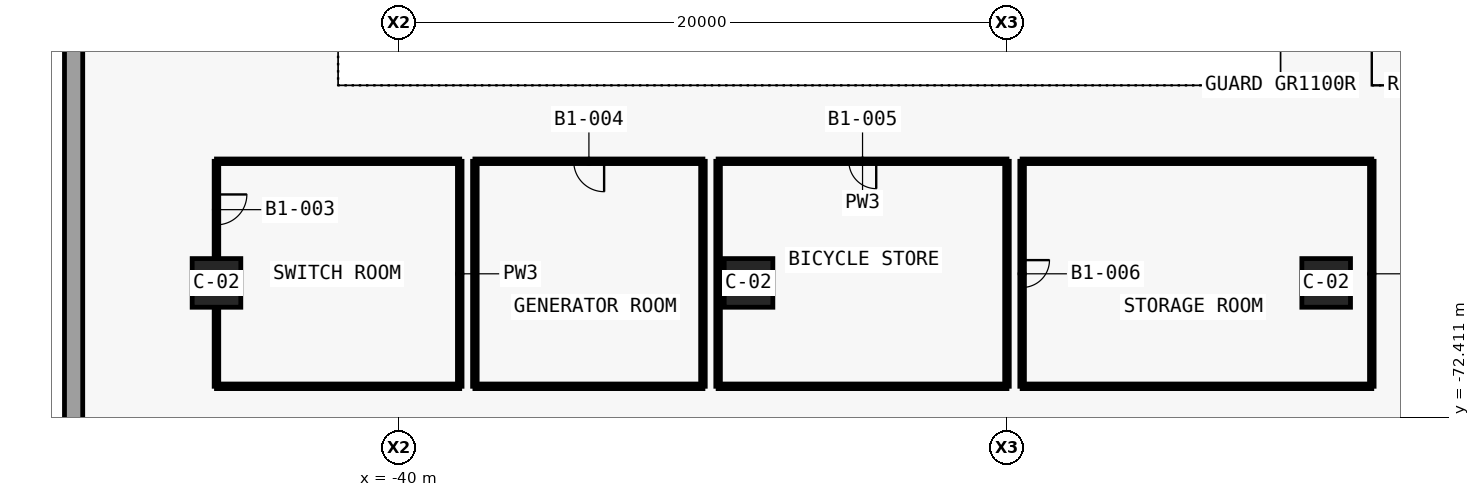
"""IFC4 building model, lengths in metres.
Left out: names, types, materials, properties, quantities, classifications, styles, units other than length and angle.
Written with IfcOpenShell. Run it as: python <this file> out.ifc"""

import sys

from ifc_helpers import new_model, si_unit, direction, frame, frame_2d, origin, origin_2d, place, context, subcontext, project, spatial, polyline, rectangle, outline, extrude, element, fill, save


model = new_model("IFC4")
c1 = context("Model", 3, precision=1e-05, world=origin(), true_north=direction((0.0, 1.0)))
c2 = subcontext(c1, "Body", "Model", "MODEL_VIEW")
j1 = project(units=[si_unit("LENGTHUNIT", "METRE"), si_unit("PLANEANGLEUNIT", "RADIAN")], contexts=[c1])
p1 = place(None, origin())
s1 = spatial("IfcSite", under=j1, at=p1, CompositionType="ELEMENT")
p2 = place(p1, origin())
s2 = spatial("IfcBuilding", under=s1, at=p2, CompositionType="ELEMENT")
p3 = place(p2, frame((0.0, 0.0, -4.5)))
s3 = spatial("IfcBuildingStorey", under=s2, at=p3, CompositionType="ELEMENT", Elevation=-4.5)
p4 = place(p3, frame((-50.7, -1.0, 0.0), z_axis=(0.0, 0.0, 1.0), x_axis=(0.0, -1.0, 0.0)))
e1 = element("IfcWall", 1, at=p4, inside=s3, PredefinedType="SOLIDWALL", context=c2, shape_type="SweptSolid", body=[
    extrude(outline(polyline([(81.4, 0.3), (81.4, -0.3), (0.6, -0.3), (0.6, 0.3), (81.4, 0.3)])), origin(), (0.0, 0.0, 1.0), 4.5),
])
for number, where, z_axis, x_axis in (
    (2, (-46.0, -68.0, 0.0), (0.0, 0.0, 1.0), (1.0, 0.0, 0.0)),
    (3, (-28.5, -68.0, 0.0), (0.0, 0.0, 1.0), (1.0, 0.0, 0.0)),
    (4, (-9.5, -68.0, 0.0), (0.0, 0.0, 1.0), (1.0, 0.0, 0.0)),
):
    element("IfcColumn", number, at=place(p3, frame(where, z_axis=z_axis, x_axis=x_axis)), inside=s3, PredefinedType="COLUMN", context=c2, shape_type="SweptSolid", body=[
        extrude(rectangle(XDim=1.6, YDim=1.6, at=origin_2d()), origin(), (0.0, 0.0, 1.0), 4.5),
    ])
p5 = place(p3, frame((-46.001, -64.0, 0.0), z_axis=(0.0, 0.0, 1.0), x_axis=(0.0, -1.0, 0.0)))
e5 = element("IfcWall", 5, at=p5, inside=s3, PredefinedType="PARTITIONING", context=c2, shape_type="SweptSolid", body=[
    extrude(rectangle(XDim=3.18, YDim=0.15, at=frame_2d((1.59, 0.0))), origin(), (0.0, 0.0, 1.0), 3.03),
])
p6 = place(p5, frame((1.09, 0.0, 0.0)))
e6 = element("IfcOpeningElement", 6, at=p6, cuts=e5, PredefinedType="OPENING", context=c2, shape_type="SweptSolid", body=[
    extrude(rectangle(XDim=1.0, YDim=2.1, at=frame_2d((0.5, 1.05))), frame((0.0, 0.085, 0.0), z_axis=(0.0, -1.0, 0.0), x_axis=(1.0, 0.0, 0.0)), (0.0, 0.0, 1.0), 0.17),
])
p7 = place(p3, frame((-46.001, -68.82, 0.0), z_axis=(0.0, 0.0, 1.0), x_axis=(0.0, -1.0, 0.0)))
e7 = element("IfcWall", 7, at=p7, inside=s3, PredefinedType="PARTITIONING", context=c2, shape_type="SweptSolid", body=[
    extrude(rectangle(XDim=2.58, YDim=0.15, at=frame_2d((1.29, 0.0))), origin(), (0.0, 0.0, 1.0), 4.05),
])
p8 = place(p3, frame((-46.0, -71.401, 0.0), z_axis=(0.0, 0.0, 1.0), x_axis=(1.0, 0.0, 0.0)))
e8 = element("IfcWall", 8, at=p8, inside=s3, PredefinedType="PARTITIONING", context=c2, shape_type="SweptSolid", body=[
    extrude(rectangle(XDim=8.0, YDim=0.15, at=frame_2d((4.0, 0.0))), origin(), (0.0, 0.0, 1.0), 4.05),
])
p9 = place(p3, frame((-37.999, -71.4, 0.0), z_axis=(0.0, 0.0, 1.0), x_axis=(0.0, 1.0, 0.0)))
e9 = element("IfcWall", 9, at=p9, inside=s3, PredefinedType="PARTITIONING", context=c2, shape_type="SweptSolid", body=[
    extrude(rectangle(XDim=7.4, YDim=0.15, at=frame_2d((3.7, 0.0))), origin(), (0.0, 0.0, 1.0), 3.03),
])
p10 = place(p3, frame((-38.0, -63.999, 0.0), z_axis=(0.0, 0.0, 1.0), x_axis=(-1.0, 0.0, 0.0)))
e10 = element("IfcWall", 10, at=p10, inside=s3, PredefinedType="PARTITIONING", context=c2, shape_type="SweptSolid", body=[
    extrude(rectangle(XDim=8.0, YDim=0.15, at=frame_2d((4.0, 0.0))), origin(), (0.0, 0.0, 1.0), 3.03),
])
p11 = place(p3, frame((-30.0, -63.999, 0.0), z_axis=(0.0, 0.0, 1.0), x_axis=(-1.0, 0.0, 0.0)))
e11 = element("IfcWall", 11, at=p11, inside=s3, PredefinedType="PARTITIONING", context=c2, shape_type="SweptSolid", body=[
    extrude(rectangle(XDim=7.5, YDim=0.15, at=frame_2d((3.75, 0.0))), origin(), (0.0, 0.0, 1.0), 3.43),
])
p12 = place(p11, frame((3.25, 0.0, 0.0)))
e12 = element("IfcOpeningElement", 12, at=p12, cuts=e11, PredefinedType="OPENING", context=c2, shape_type="SweptSolid", body=[
    extrude(rectangle(XDim=1.0, YDim=2.1, at=frame_2d((0.5, 1.05))), frame((0.0, 0.085, 0.0), z_axis=(0.0, -1.0, 0.0), x_axis=(1.0, 0.0, 0.0)), (0.0, 0.0, 1.0), 0.17),
])
p13 = place(p3, frame((-37.501, -64.0, 0.0), z_axis=(0.0, 0.0, 1.0), x_axis=(0.0, -1.0, 0.0)))
e13 = element("IfcWall", 13, at=p13, inside=s3, PredefinedType="PARTITIONING", context=c2, shape_type="SweptSolid", body=[
    extrude(rectangle(XDim=7.4, YDim=0.15, at=frame_2d((3.7, 0.0))), origin(), (0.0, 0.0, 1.0), 3.03),
])
p14 = place(p3, frame((-37.5, -71.401, 0.0), z_axis=(0.0, 0.0, 1.0), x_axis=(1.0, 0.0, 0.0)))
e14 = element("IfcWall", 14, at=p14, inside=s3, PredefinedType="PARTITIONING", context=c2, shape_type="SweptSolid", body=[
    extrude(rectangle(XDim=7.5, YDim=0.15, at=frame_2d((3.75, 0.0))), origin(), (0.0, 0.0, 1.0), 4.05),
])
p15 = place(p3, frame((-29.999, -71.4, 0.0), z_axis=(0.0, 0.0, 1.0), x_axis=(0.0, 1.0, 0.0)))
e15 = element("IfcWall", 15, at=p15, inside=s3, PredefinedType="PARTITIONING", context=c2, shape_type="SweptSolid", body=[
    extrude(rectangle(XDim=7.4, YDim=0.15, at=frame_2d((3.7, 0.0))), origin(), (0.0, 0.0, 1.0), 3.03),
])
p16 = place(p3, frame((-20.0, -63.999, 0.0), z_axis=(0.0, 0.0, 1.0), x_axis=(-1.0, 0.0, 0.0)))
e16 = element("IfcWall", 16, at=p16, inside=s3, PredefinedType="PARTITIONING", context=c2, shape_type="SweptSolid", body=[
    extrude(rectangle(XDim=9.5, YDim=0.15, at=frame_2d((4.75, 0.0))), origin(), (0.0, 0.0, 1.0), 3.03),
])
p17 = place(p16, frame((4.3, 0.0, 0.0)))
e17 = element("IfcOpeningElement", 17, at=p17, cuts=e16, PredefinedType="OPENING", context=c2, shape_type="SweptSolid", body=[
    extrude(rectangle(XDim=0.9, YDim=2.1, at=frame_2d((0.45, 1.05))), frame((0.0, 0.085, 0.0), z_axis=(0.0, -1.0, 0.0), x_axis=(1.0, 0.0, 0.0)), (0.0, 0.0, 1.0), 0.17),
])
p18 = place(p3, frame((-29.501, -64.0, 0.0), z_axis=(0.0, 0.0, 1.0), x_axis=(0.0, -1.0, 0.0)))
e18 = element("IfcWall", 18, at=p18, inside=s3, PredefinedType="PARTITIONING", context=c2, shape_type="SweptSolid", body=[
    extrude(rectangle(XDim=7.4, YDim=0.15, at=frame_2d((3.7, 0.0))), origin(), (0.0, 0.0, 1.0), 3.03),
])
p19 = place(p3, frame((-29.5, -71.401, 0.0), z_axis=(0.0, 0.0, 1.0), x_axis=(1.0, 0.0, 0.0)))
e19 = element("IfcWall", 19, at=p19, inside=s3, PredefinedType="PARTITIONING", context=c2, shape_type="SweptSolid", body=[
    extrude(rectangle(XDim=9.5, YDim=0.15, at=frame_2d((4.75, 0.0))), origin(), (0.0, 0.0, 1.0), 3.03),
])
p20 = place(p3, frame((-19.999, -71.4, 0.0), z_axis=(0.0, 0.0, 1.0), x_axis=(0.0, 1.0, 0.0)))
e20 = element("IfcWall", 20, at=p20, inside=s3, PredefinedType="PARTITIONING", context=c2, shape_type="SweptSolid", body=[
    extrude(rectangle(XDim=7.4, YDim=0.15, at=frame_2d((3.7, 0.0))), origin(), (0.0, 0.0, 1.0), 3.03),
])
p21 = place(p3, frame((-19.501, -64.0, 0.0), z_axis=(0.0, 0.0, 1.0), x_axis=(0.0, -1.0, 0.0)))
e21 = element("IfcWall", 21, at=p21, inside=s3, PredefinedType="PARTITIONING", context=c2, shape_type="SweptSolid", body=[
    extrude(rectangle(XDim=7.4, YDim=0.15, at=frame_2d((3.7, 0.0))), origin(), (0.0, 0.0, 1.0), 3.03),
])
p22 = place(p21, frame((3.25, 0.0, 0.0)))
e22 = element("IfcOpeningElement", 22, at=p22, cuts=e21, PredefinedType="OPENING", context=c2, shape_type="SweptSolid", body=[
    extrude(rectangle(XDim=0.9, YDim=2.1, at=frame_2d((0.45, 1.05))), frame((0.0, 0.085, 0.0), z_axis=(0.0, -1.0, 0.0), x_axis=(1.0, 0.0, 0.0)), (0.0, 0.0, 1.0), 0.17),
])
p23 = place(p3, frame((-19.5, -71.401, 0.0), z_axis=(0.0, 0.0, 1.0), x_axis=(1.0, 0.0, 0.0)))
e23 = element("IfcWall", 23, at=p23, inside=s3, PredefinedType="PARTITIONING", context=c2, shape_type="SweptSolid", body=[
    extrude(rectangle(XDim=11.5, YDim=0.15, at=frame_2d((5.75, 0.0))), origin(), (0.0, 0.0, 1.0), 4.05),
])
p24 = place(p3, frame((-7.999, -71.4, 0.0), z_axis=(0.0, 0.0, 1.0), x_axis=(0.0, 1.0, 0.0)))
e24 = element("IfcWall", 24, at=p24, inside=s3, PredefinedType="PARTITIONING", context=c2, shape_type="SweptSolid", body=[
    extrude(rectangle(XDim=7.4, YDim=0.15, at=frame_2d((3.7, 0.0))), origin(), (0.0, 0.0, 1.0), 3.03),
])
p25 = place(p3, frame((-8.0, -63.999, 0.0), z_axis=(0.0, 0.0, 1.0), x_axis=(-1.0, 0.0, 0.0)))
e25 = element("IfcWall", 25, at=p25, inside=s3, PredefinedType="PARTITIONING", context=c2, shape_type="SweptSolid", body=[
    extrude(rectangle(XDim=11.5, YDim=0.15, at=frame_2d((5.75, 0.0))), origin(), (0.0, 0.0, 1.0), 3.03),
])
p26 = place(p6, origin())
e26 = element("IfcDoor", 26, at=p26, inside=s3, OperationType="SINGLE_SWING_RIGHT", PredefinedType="DOOR", context=c2, shape_type="SweptSolid", body=[
    extrude(rectangle(XDim=1.0, YDim=2.1, at=frame_2d((0.5, 1.05))), frame((0.0, 0.025, 0.0), z_axis=(0.0, -1.0, 0.0), x_axis=(1.0, 0.0, 0.0)), (0.0, 0.0, 1.0), 0.05),
])
fill(e6, e26)
p27 = place(p12, origin())
e27 = element("IfcDoor", 27, at=p27, inside=s3, OperationType="SINGLE_SWING_LEFT", PredefinedType="DOOR", context=c2, shape_type="SweptSolid", body=[
    extrude(rectangle(XDim=1.0, YDim=2.1, at=frame_2d((0.5, 1.05))), frame((0.0, 0.025, 0.0), z_axis=(0.0, -1.0, 0.0), x_axis=(1.0, 0.0, 0.0)), (0.0, 0.0, 1.0), 0.05),
])
fill(e12, e27)
p28 = place(p17, origin())
e28 = element("IfcDoor", 28, at=p28, inside=s3, OperationType="SINGLE_SWING_LEFT", PredefinedType="DOOR", context=c2, shape_type="SweptSolid", body=[
    extrude(rectangle(XDim=0.9, YDim=2.1, at=frame_2d((0.45, 1.05))), frame((0.0, 0.025, 0.0), z_axis=(0.0, -1.0, 0.0), x_axis=(1.0, 0.0, 0.0)), (0.0, 0.0, 1.0), 0.05),
])
fill(e17, e28)
p29 = place(p22, origin())
e29 = element("IfcDoor", 29, at=p29, inside=s3, OperationType="SINGLE_SWING_LEFT", PredefinedType="DOOR", context=c2, shape_type="SweptSolid", body=[
    extrude(rectangle(XDim=0.9, YDim=2.1, at=frame_2d((0.45, 1.05))), frame((0.0, 0.025, 0.0), z_axis=(0.0, -1.0, 0.0), x_axis=(1.0, 0.0, 0.0)), (0.0, 0.0, 1.0), 0.05),
])
fill(e22, e29)
save(model, sys.argv[1])
